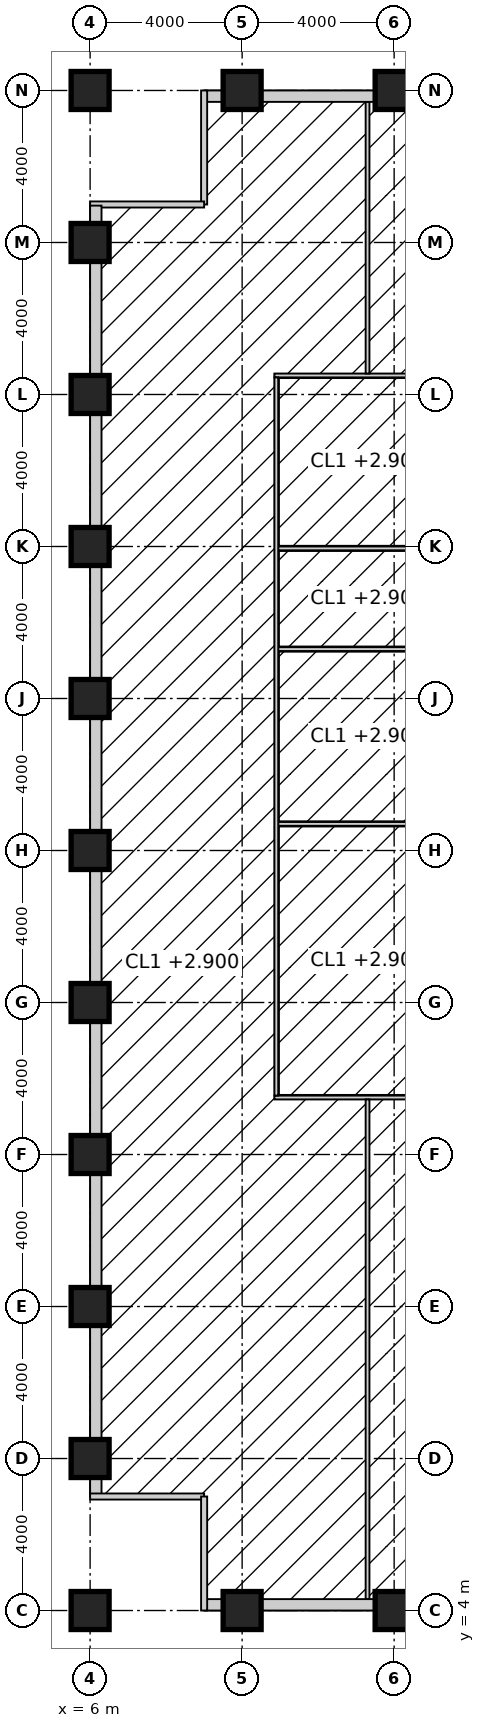
"""IFC4 building model, lengths in metres.
Left out: names, types, materials, properties, quantities, classifications, styles, units other than length and angle.
Written with IfcOpenShell. Run it as: python <this file> out.ifc"""

import sys

from ifc_helpers import new_model, si_unit, direction, frame, frame_2d, origin, origin_2d, place, context, subcontext, project, spatial, rectangle, hollow_rectangle, extrude, element, fill, save


model = new_model("IFC4")
c1 = context("Model", 3, precision=1e-05, world=origin(), true_north=direction((0.0, 1.0)))
c2 = subcontext(c1, "Body", "Model", "MODEL_VIEW")
j1 = project(units=[si_unit("LENGTHUNIT", "METRE"), si_unit("PLANEANGLEUNIT", "RADIAN")], contexts=[c1])
p1 = place(None, origin())
s1 = spatial("IfcSite", under=j1, at=p1, CompositionType="ELEMENT")
p2 = place(p1, origin())
s2 = spatial("IfcBuilding", under=s1, at=p2, CompositionType="ELEMENT")
p3 = place(p2, frame((0.0, 0.0, 278.2)))
s3 = spatial("IfcBuildingStorey", under=s2, at=p3, CompositionType="ELEMENT", Elevation=278.2)
for number, where, z_axis, x_axis in (
    (1, (6.0, 4.0, 0.0), (0.0, 0.0, 1.0), (1.0, 0.0, 0.0)),
    (2, (6.0, 8.0, 0.0), (0.0, 0.0, 1.0), (1.0, 0.0, 0.0)),
    (3, (6.0, 12.0, 0.0), (0.0, 0.0, 1.0), (1.0, 0.0, 0.0)),
    (4, (6.0, 16.0, 0.0), (0.0, 0.0, 1.0), (1.0, 0.0, 0.0)),
    (5, (6.0, 20.0, 0.0), (0.0, 0.0, 1.0), (1.0, 0.0, 0.0)),
    (6, (6.0, 24.0, 0.0), (0.0, 0.0, 1.0), (1.0, 0.0, 0.0)),
    (7, (6.0, 28.0, 0.0), (0.0, 0.0, 1.0), (1.0, 0.0, 0.0)),
    (8, (6.0, 32.0, 0.0), (0.0, 0.0, 1.0), (1.0, 0.0, 0.0)),
    (9, (6.0, 36.0, 0.0), (0.0, 0.0, 1.0), (1.0, 0.0, 0.0)),
    (10, (6.0, 40.0, 0.0), (0.0, 0.0, 1.0), (1.0, 0.0, 0.0)),
    (11, (6.0, 44.0, 0.0), (0.0, 0.0, 1.0), (1.0, 0.0, 0.0)),
    (12, (10.0, 4.0, 0.0), (0.0, 0.0, 1.0), (1.0, 0.0, 0.0)),
    (13, (10.0, 44.0, 0.0), (0.0, 0.0, 1.0), (1.0, 0.0, 0.0)),
    (14, (14.0, 4.0, 0.0), (0.0, 0.0, 1.0), (1.0, 0.0, 0.0)),
    (15, (14.0, 44.0, 0.0), (0.0, 0.0, 1.0), (1.0, 0.0, 0.0)),
):
    element("IfcColumn", number, at=place(p3, frame(where, z_axis=z_axis, x_axis=x_axis)), inside=s3, PredefinedType="COLUMN", context=c2, shape_type="SweptSolid", body=[
        extrude(hollow_rectangle(XDim=1.0, YDim=1.0, WallThickness=0.1, at=origin_2d()), origin(), (0.0, 0.0, 1.0), 4.0),
    ])
p4 = place(p3, frame((10.85, 17.5, 0.0), z_axis=(0.0, 0.0, 1.0), x_axis=(1.0, 0.0, 0.0)))
e16 = element("IfcWall", 16, at=p4, inside=s3, PredefinedType="PARTITIONING", context=c2, shape_type="SweptSolid", body=[
    extrude(rectangle(XDim=4.9, YDim=0.1, at=frame_2d((2.45, 0.0))), origin(), (0.0, 0.0, 1.0), 3.85),
])
for number, where, z_axis, x_axis in (
    (17, (10.95, 24.7, 0.0), (0.0, 0.0, 1.0), (1.0, 0.0, 0.0)),
    (18, (10.95, 29.3, 0.0), (0.0, 0.0, 1.0), (1.0, 0.0, 0.0)),
):
    element("IfcWall", number, at=place(p3, frame(where, z_axis=z_axis, x_axis=x_axis)), inside=s3, PredefinedType="PARTITIONING", context=c2, shape_type="SweptSolid", body=[
        extrude(rectangle(XDim=4.7, YDim=0.1, at=frame_2d((2.35, 0.0))), origin(), (0.0, 0.0, 1.0), 3.85),
    ])
p5 = place(p3, frame((10.95, 31.95, 0.0), z_axis=(0.0, 0.0, 1.0), x_axis=(1.0, 0.0, 0.0)))
e19 = element("IfcWall", 19, at=p5, inside=s3, PredefinedType="PARTITIONING", context=c2, shape_type="SweptSolid", body=[
    extrude(rectangle(XDim=4.7, YDim=0.1, at=frame_2d((2.35, 0.0))), origin(), (0.0, 0.0, 1.0), 2.95),
])
p6 = place(p3, frame((10.85, 36.5, 0.0), z_axis=(0.0, 0.0, 1.0), x_axis=(1.0, 0.0, 0.0)))
e20 = element("IfcWall", 20, at=p6, inside=s3, PredefinedType="PARTITIONING", context=c2, shape_type="SweptSolid", body=[
    extrude(rectangle(XDim=4.9, YDim=0.1, at=frame_2d((2.45, 0.0))), origin(), (0.0, 0.0, 1.0), 2.85),
])
p7 = place(p3, frame((10.9, 17.55, 0.0), z_axis=(0.0, 0.0, 1.0), x_axis=(0.0, 1.0, 0.0)))
e21 = element("IfcWall", 21, at=p7, inside=s3, PredefinedType="PARTITIONING", context=c2, shape_type="SweptSolid", body=[
    extrude(rectangle(XDim=18.9, YDim=0.1, at=frame_2d((9.45, 0.0))), origin(), (0.0, 0.0, 1.0), 3.85),
])
p8 = place(p7, frame((2.65, 0.0, 0.0)))
e22 = element("IfcOpeningElement", 22, at=p8, cuts=e21, PredefinedType="OPENING", context=c2, shape_type="SweptSolid", body=[
    extrude(rectangle(XDim=1.8, YDim=2.4, at=frame_2d((0.9, 1.2))), frame((0.0, 0.06, 0.0), z_axis=(0.0, -1.0, 0.0), x_axis=(1.0, 0.0, 0.0)), (0.0, 0.0, 1.0), 0.12),
])
p9 = place(p7, frame((8.95, 0.0, 0.0)))
e23 = element("IfcOpeningElement", 23, at=p9, cuts=e21, PredefinedType="OPENING", context=c2, shape_type="SweptSolid", body=[
    extrude(rectangle(XDim=1.0, YDim=2.2, at=frame_2d((0.5, 1.1))), frame((0.0, 0.06, 0.0), z_axis=(0.0, -1.0, 0.0), x_axis=(1.0, 0.0, 0.0)), (0.0, 0.0, 1.0), 0.12),
])
p10 = place(p7, frame((12.575, 0.0, 0.0)))
e24 = element("IfcOpeningElement", 24, at=p10, cuts=e21, PredefinedType="OPENING", context=c2, shape_type="SweptSolid", body=[
    extrude(rectangle(XDim=1.0, YDim=2.2, at=frame_2d((0.5, 1.1))), frame((0.0, 0.06, 0.0), z_axis=(0.0, -1.0, 0.0), x_axis=(1.0, 0.0, 0.0)), (0.0, 0.0, 1.0), 0.12),
])
p11 = place(p7, frame((16.175, 0.0, 0.0)))
e25 = element("IfcOpeningElement", 25, at=p11, cuts=e21, PredefinedType="OPENING", context=c2, shape_type="SweptSolid", body=[
    extrude(rectangle(XDim=1.0, YDim=2.2, at=frame_2d((0.5, 1.1))), frame((0.0, 0.06, 0.0), z_axis=(0.0, -1.0, 0.0), x_axis=(1.0, 0.0, 0.0)), (0.0, 0.0, 1.0), 0.12),
])
p12 = place(p3, frame((13.3, 4.3, 0.0), z_axis=(0.0, 0.0, 1.0), x_axis=(0.0, 1.0, 0.0)))
e26 = element("IfcWall", 26, at=p12, inside=s3, PredefinedType="PARTITIONING", context=c2, shape_type="SweptSolid", body=[
    extrude(rectangle(XDim=13.15, YDim=0.1, at=frame_2d((6.575, 0.0))), origin(), (0.0, 0.0, 1.0), 3.85),
])
p13 = place(p12, frame((6.075, 0.0, 0.0)))
e27 = element("IfcOpeningElement", 27, at=p13, cuts=e26, PredefinedType="OPENING", context=c2, shape_type="SweptSolid", body=[
    extrude(rectangle(XDim=1.0, YDim=2.2, at=frame_2d((0.5, 1.1))), frame((0.0, 0.06, 0.0), z_axis=(0.0, -1.0, 0.0), x_axis=(1.0, 0.0, 0.0)), (0.0, 0.0, 1.0), 0.12),
])
p14 = place(p3, frame((13.3, 36.55, 0.0), z_axis=(0.0, 0.0, 1.0), x_axis=(0.0, 1.0, 0.0)))
e28 = element("IfcWall", 28, at=p14, inside=s3, PredefinedType="PARTITIONING", context=c2, shape_type="SweptSolid", body=[
    extrude(rectangle(XDim=7.15, YDim=0.1, at=frame_2d((3.575, 0.0))), origin(), (0.0, 0.0, 1.0), 3.85),
])
p15 = place(p3, frame((9.03, 4.15, 0.0), z_axis=(0.0, 0.0, 1.0), x_axis=(1.0, 0.0, 0.0)))
e29 = element("IfcWall", 29, at=p15, inside=s3, PredefinedType="ELEMENTEDWALL", context=c2, shape_type="SweptSolid", body=[
    extrude(rectangle(XDim=0.47, YDim=0.3, at=frame_2d((0.235, 0.0))), origin(), (0.0, 0.0, 1.0), 2.95),
])
p16 = place(p3, frame((10.5, 4.15, 0.0), z_axis=(0.0, 0.0, 1.0), x_axis=(1.0, 0.0, 0.0)))
e30 = element("IfcWall", 30, at=p16, inside=s3, PredefinedType="ELEMENTEDWALL", context=c2, shape_type="SweptSolid", body=[
    extrude(rectangle(XDim=3.0, YDim=0.3, at=frame_2d((1.5, 0.0))), origin(), (0.0, 0.0, 1.0), 2.85),
])
p17 = place(p16, frame((0.5, 0.0, 0.8)))
e31 = element("IfcOpeningElement", 31, at=p17, cuts=e30, PredefinedType="OPENING", context=c2, shape_type="SweptSolid", body=[
    extrude(rectangle(XDim=2.0, YDim=2.0, at=frame_2d((1.0, 1.0))), frame((0.0, 0.16, 0.0), z_axis=(0.0, -1.0, 0.0), x_axis=(1.0, 0.0, 0.0)), (0.0, 0.0, 1.0), 0.32),
])
p18 = place(p3, frame((9.5, 43.85, 0.0), z_axis=(0.0, 0.0, 1.0), x_axis=(-1.0, 0.0, 0.0)))
e32 = element("IfcWall", 32, at=p18, inside=s3, PredefinedType="ELEMENTEDWALL", context=c2, shape_type="SweptSolid", body=[
    extrude(rectangle(XDim=0.47, YDim=0.3, at=frame_2d((0.235, 0.0))), origin(), (0.0, 0.0, 1.0), 2.95),
])
p19 = place(p3, frame((13.5, 43.85, 0.0), z_axis=(0.0, 0.0, 1.0), x_axis=(-1.0, 0.0, 0.0)))
e33 = element("IfcWall", 33, at=p19, inside=s3, PredefinedType="ELEMENTEDWALL", context=c2, shape_type="SweptSolid", body=[
    extrude(rectangle(XDim=3.0, YDim=0.3, at=frame_2d((1.5, 0.0))), origin(), (0.0, 0.0, 1.0), 2.85),
])
p20 = place(p19, frame((0.5, 0.0, 0.8)))
e34 = element("IfcOpeningElement", 34, at=p20, cuts=e33, PredefinedType="OPENING", context=c2, shape_type="SweptSolid", body=[
    extrude(rectangle(XDim=2.0, YDim=2.0, at=frame_2d((1.0, 1.0))), frame((0.0, 0.16, 0.0), z_axis=(0.0, -1.0, 0.0), x_axis=(1.0, 0.0, 0.0)), (0.0, 0.0, 1.0), 0.32),
])
p21 = place(p3, frame((6.15, 7.5, 0.0), z_axis=(0.0, 0.0, 1.0), x_axis=(0.0, -1.0, 0.0)))
e35 = element("IfcWall", 35, at=p21, inside=s3, PredefinedType="ELEMENTEDWALL", context=c2, shape_type="SweptSolid", body=[
    extrude(rectangle(XDim=0.47, YDim=0.3, at=frame_2d((0.235, 0.0))), origin(), (0.0, 0.0, 1.0), 2.95),
])
p22 = place(p3, frame((6.15, 11.5, 0.0), z_axis=(0.0, 0.0, 1.0), x_axis=(0.0, -1.0, 0.0)))
e36 = element("IfcWall", 36, at=p22, inside=s3, PredefinedType="ELEMENTEDWALL", context=c2, shape_type="SweptSolid", body=[
    extrude(rectangle(XDim=3.0, YDim=0.3, at=frame_2d((1.5, 0.0))), origin(), (0.0, 0.0, 1.0), 2.85),
])
p23 = place(p22, frame((0.5, 0.0, 0.8)))
e37 = element("IfcOpeningElement", 37, at=p23, cuts=e36, PredefinedType="OPENING", context=c2, shape_type="SweptSolid", body=[
    extrude(rectangle(XDim=2.0, YDim=2.0, at=frame_2d((1.0, 1.0))), frame((0.0, 0.16, 0.0), z_axis=(0.0, -1.0, 0.0), x_axis=(1.0, 0.0, 0.0)), (0.0, 0.0, 1.0), 0.32),
])
p24 = place(p3, frame((6.15, 15.5, 0.0), z_axis=(0.0, 0.0, 1.0), x_axis=(0.0, -1.0, 0.0)))
e38 = element("IfcWall", 38, at=p24, inside=s3, PredefinedType="ELEMENTEDWALL", context=c2, shape_type="SweptSolid", body=[
    extrude(rectangle(XDim=3.0, YDim=0.3, at=frame_2d((1.5, 0.0))), origin(), (0.0, 0.0, 1.0), 2.85),
])
p25 = place(p24, frame((0.5, 0.0, 0.8)))
e39 = element("IfcOpeningElement", 39, at=p25, cuts=e38, PredefinedType="OPENING", context=c2, shape_type="SweptSolid", body=[
    extrude(rectangle(XDim=2.0, YDim=2.0, at=frame_2d((1.0, 1.0))), frame((0.0, 0.16, 0.0), z_axis=(0.0, -1.0, 0.0), x_axis=(1.0, 0.0, 0.0)), (0.0, 0.0, 1.0), 0.32),
])
p26 = place(p3, frame((6.15, 19.5, 0.0), z_axis=(0.0, 0.0, 1.0), x_axis=(0.0, -1.0, 0.0)))
e40 = element("IfcWall", 40, at=p26, inside=s3, PredefinedType="ELEMENTEDWALL", context=c2, shape_type="SweptSolid", body=[
    extrude(rectangle(XDim=3.0, YDim=0.3, at=frame_2d((1.5, 0.0))), origin(), (0.0, 0.0, 1.0), 2.85),
])
p27 = place(p26, frame((0.5, 0.0, 0.8)))
e41 = element("IfcOpeningElement", 41, at=p27, cuts=e40, PredefinedType="OPENING", context=c2, shape_type="SweptSolid", body=[
    extrude(rectangle(XDim=2.0, YDim=2.0, at=frame_2d((1.0, 1.0))), frame((0.0, 0.16, 0.0), z_axis=(0.0, -1.0, 0.0), x_axis=(1.0, 0.0, 0.0)), (0.0, 0.0, 1.0), 0.32),
])
p28 = place(p3, frame((6.15, 23.5, 0.0), z_axis=(0.0, 0.0, 1.0), x_axis=(0.0, -1.0, 0.0)))
e42 = element("IfcWall", 42, at=p28, inside=s3, PredefinedType="ELEMENTEDWALL", context=c2, shape_type="SweptSolid", body=[
    extrude(rectangle(XDim=3.0, YDim=0.3, at=frame_2d((1.5, 0.0))), origin(), (0.0, 0.0, 1.0), 2.85),
])
p29 = place(p28, frame((0.5, 0.0, 0.8)))
e43 = element("IfcOpeningElement", 43, at=p29, cuts=e42, PredefinedType="OPENING", context=c2, shape_type="SweptSolid", body=[
    extrude(rectangle(XDim=2.0, YDim=2.0, at=frame_2d((1.0, 1.0))), frame((0.0, 0.16, 0.0), z_axis=(0.0, -1.0, 0.0), x_axis=(1.0, 0.0, 0.0)), (0.0, 0.0, 1.0), 0.32),
])
p30 = place(p3, frame((6.15, 27.5, 0.0), z_axis=(0.0, 0.0, 1.0), x_axis=(0.0, -1.0, 0.0)))
e44 = element("IfcWall", 44, at=p30, inside=s3, PredefinedType="ELEMENTEDWALL", context=c2, shape_type="SweptSolid", body=[
    extrude(rectangle(XDim=3.0, YDim=0.3, at=frame_2d((1.5, 0.0))), origin(), (0.0, 0.0, 1.0), 2.85),
])
p31 = place(p30, frame((0.5, 0.0, 0.8)))
e45 = element("IfcOpeningElement", 45, at=p31, cuts=e44, PredefinedType="OPENING", context=c2, shape_type="SweptSolid", body=[
    extrude(rectangle(XDim=2.0, YDim=2.0, at=frame_2d((1.0, 1.0))), frame((0.0, 0.16, 0.0), z_axis=(0.0, -1.0, 0.0), x_axis=(1.0, 0.0, 0.0)), (0.0, 0.0, 1.0), 0.32),
])
p32 = place(p3, frame((6.15, 31.5, 0.0), z_axis=(0.0, 0.0, 1.0), x_axis=(0.0, -1.0, 0.0)))
e46 = element("IfcWall", 46, at=p32, inside=s3, PredefinedType="ELEMENTEDWALL", context=c2, shape_type="SweptSolid", body=[
    extrude(rectangle(XDim=3.0, YDim=0.3, at=frame_2d((1.5, 0.0))), origin(), (0.0, 0.0, 1.0), 2.85),
])
p33 = place(p32, frame((0.5, 0.0, 0.8)))
e47 = element("IfcOpeningElement", 47, at=p33, cuts=e46, PredefinedType="OPENING", context=c2, shape_type="SweptSolid", body=[
    extrude(rectangle(XDim=2.0, YDim=2.0, at=frame_2d((1.0, 1.0))), frame((0.0, 0.16, 0.0), z_axis=(0.0, -1.0, 0.0), x_axis=(1.0, 0.0, 0.0)), (0.0, 0.0, 1.0), 0.32),
])
p34 = place(p3, frame((6.15, 35.5, 0.0), z_axis=(0.0, 0.0, 1.0), x_axis=(0.0, -1.0, 0.0)))
e48 = element("IfcWall", 48, at=p34, inside=s3, PredefinedType="ELEMENTEDWALL", context=c2, shape_type="SweptSolid", body=[
    extrude(rectangle(XDim=3.0, YDim=0.3, at=frame_2d((1.5, 0.0))), origin(), (0.0, 0.0, 1.0), 2.85),
])
p35 = place(p34, frame((0.5, 0.0, 0.8)))
e49 = element("IfcOpeningElement", 49, at=p35, cuts=e48, PredefinedType="OPENING", context=c2, shape_type="SweptSolid", body=[
    extrude(rectangle(XDim=2.0, YDim=2.0, at=frame_2d((1.0, 1.0))), frame((0.0, 0.16, 0.0), z_axis=(0.0, -1.0, 0.0), x_axis=(1.0, 0.0, 0.0)), (0.0, 0.0, 1.0), 0.32),
])
p36 = place(p3, frame((6.15, 39.5, 0.0), z_axis=(0.0, 0.0, 1.0), x_axis=(0.0, -1.0, 0.0)))
e50 = element("IfcWall", 50, at=p36, inside=s3, PredefinedType="ELEMENTEDWALL", context=c2, shape_type="SweptSolid", body=[
    extrude(rectangle(XDim=3.0, YDim=0.3, at=frame_2d((1.5, 0.0))), origin(), (0.0, 0.0, 1.0), 2.85),
])
p37 = place(p36, frame((0.5, 0.0, 0.8)))
e51 = element("IfcOpeningElement", 51, at=p37, cuts=e50, PredefinedType="OPENING", context=c2, shape_type="SweptSolid", body=[
    extrude(rectangle(XDim=2.0, YDim=2.0, at=frame_2d((1.0, 1.0))), frame((0.0, 0.16, 0.0), z_axis=(0.0, -1.0, 0.0), x_axis=(1.0, 0.0, 0.0)), (0.0, 0.0, 1.0), 0.32),
])
p38 = place(p3, frame((6.15, 40.97, 0.0), z_axis=(0.0, 0.0, 1.0), x_axis=(0.0, -1.0, 0.0)))
e52 = element("IfcWall", 52, at=p38, inside=s3, PredefinedType="ELEMENTEDWALL", context=c2, shape_type="SweptSolid", body=[
    extrude(rectangle(XDim=0.47, YDim=0.3, at=frame_2d((0.235, 0.0))), origin(), (0.0, 0.0, 1.0), 2.95),
])
p39 = place(p8, origin())
e53 = element("IfcDoor", 53, at=p39, inside=s3, OperationType="DOUBLE_DOOR_DOUBLE_SWING", PredefinedType="DOOR", context=c2, shape_type="SweptSolid", body=[
    extrude(rectangle(XDim=1.8, YDim=2.4, at=frame_2d((0.9, 1.2))), frame((0.0, 0.025, 0.0), z_axis=(0.0, -1.0, 0.0), x_axis=(1.0, 0.0, 0.0)), (0.0, 0.0, 1.0), 0.05),
])
fill(e22, e53)
p40 = place(p9, origin())
e54 = element("IfcDoor", 54, at=p40, inside=s3, OperationType="SINGLE_SWING_LEFT", PredefinedType="DOOR", context=c2, shape_type="SweptSolid", body=[
    extrude(rectangle(XDim=1.0, YDim=2.2, at=frame_2d((0.5, 1.1))), frame((0.0, 0.025, 0.0), z_axis=(0.0, -1.0, 0.0), x_axis=(1.0, 0.0, 0.0)), (0.0, 0.0, 1.0), 0.05),
])
fill(e23, e54)
p41 = place(p10, origin())
e55 = element("IfcDoor", 55, at=p41, inside=s3, OperationType="SINGLE_SWING_LEFT", PredefinedType="DOOR", context=c2, shape_type="SweptSolid", body=[
    extrude(rectangle(XDim=1.0, YDim=2.2, at=frame_2d((0.5, 1.1))), frame((0.0, 0.025, 0.0), z_axis=(0.0, -1.0, 0.0), x_axis=(1.0, 0.0, 0.0)), (0.0, 0.0, 1.0), 0.05),
])
fill(e24, e55)
p42 = place(p11, origin())
e56 = element("IfcDoor", 56, at=p42, inside=s3, OperationType="SINGLE_SWING_LEFT", PredefinedType="DOOR", context=c2, shape_type="SweptSolid", body=[
    extrude(rectangle(XDim=1.0, YDim=2.2, at=frame_2d((0.5, 1.1))), frame((0.0, 0.025, 0.0), z_axis=(0.0, -1.0, 0.0), x_axis=(1.0, 0.0, 0.0)), (0.0, 0.0, 1.0), 0.05),
])
fill(e25, e56)
p43 = place(p13, origin())
e57 = element("IfcDoor", 57, at=p43, inside=s3, OperationType="SINGLE_SWING_RIGHT", PredefinedType="DOOR", context=c2, shape_type="SweptSolid", body=[
    extrude(rectangle(XDim=1.0, YDim=2.2, at=frame_2d((0.5, 1.1))), frame((0.0, 0.025, 0.0), z_axis=(0.0, -1.0, 0.0), x_axis=(1.0, 0.0, 0.0)), (0.0, 0.0, 1.0), 0.05),
])
fill(e27, e57)
p44 = place(p17, origin())
e58 = element("IfcWindow", 58, at=p44, inside=s3, PartitioningType="SINGLE_PANEL", PredefinedType="WINDOW", context=c2, shape_type="SweptSolid", body=[
    extrude(rectangle(XDim=2.0, YDim=2.0, at=frame_2d((1.0, 1.0))), frame((0.0, 0.03, 0.0), z_axis=(0.0, -1.0, 0.0), x_axis=(1.0, 0.0, 0.0)), (0.0, 0.0, 1.0), 0.06),
])
fill(e31, e58)
p45 = place(p20, origin())
e59 = element("IfcWindow", 59, at=p45, inside=s3, PartitioningType="SINGLE_PANEL", PredefinedType="WINDOW", context=c2, shape_type="SweptSolid", body=[
    extrude(rectangle(XDim=2.0, YDim=2.0, at=frame_2d((1.0, 1.0))), frame((0.0, 0.03, 0.0), z_axis=(0.0, -1.0, 0.0), x_axis=(1.0, 0.0, 0.0)), (0.0, 0.0, 1.0), 0.06),
])
fill(e34, e59)
p46 = place(p23, origin())
e60 = element("IfcWindow", 60, at=p46, inside=s3, PartitioningType="SINGLE_PANEL", PredefinedType="WINDOW", context=c2, shape_type="SweptSolid", body=[
    extrude(rectangle(XDim=2.0, YDim=2.0, at=frame_2d((1.0, 1.0))), frame((0.0, 0.03, 0.0), z_axis=(0.0, -1.0, 0.0), x_axis=(1.0, 0.0, 0.0)), (0.0, 0.0, 1.0), 0.06),
])
fill(e37, e60)
p47 = place(p25, origin())
e61 = element("IfcWindow", 61, at=p47, inside=s3, PartitioningType="SINGLE_PANEL", PredefinedType="WINDOW", context=c2, shape_type="SweptSolid", body=[
    extrude(rectangle(XDim=2.0, YDim=2.0, at=frame_2d((1.0, 1.0))), frame((0.0, 0.03, 0.0), z_axis=(0.0, -1.0, 0.0), x_axis=(1.0, 0.0, 0.0)), (0.0, 0.0, 1.0), 0.06),
])
fill(e39, e61)
p48 = place(p27, origin())
e62 = element("IfcWindow", 62, at=p48, inside=s3, PartitioningType="SINGLE_PANEL", PredefinedType="WINDOW", context=c2, shape_type="SweptSolid", body=[
    extrude(rectangle(XDim=2.0, YDim=2.0, at=frame_2d((1.0, 1.0))), frame((0.0, 0.03, 0.0), z_axis=(0.0, -1.0, 0.0), x_axis=(1.0, 0.0, 0.0)), (0.0, 0.0, 1.0), 0.06),
])
fill(e41, e62)
p49 = place(p29, origin())
e63 = element("IfcWindow", 63, at=p49, inside=s3, PartitioningType="SINGLE_PANEL", PredefinedType="WINDOW", context=c2, shape_type="SweptSolid", body=[
    extrude(rectangle(XDim=2.0, YDim=2.0, at=frame_2d((1.0, 1.0))), frame((0.0, 0.03, 0.0), z_axis=(0.0, -1.0, 0.0), x_axis=(1.0, 0.0, 0.0)), (0.0, 0.0, 1.0), 0.06),
])
fill(e43, e63)
p50 = place(p31, origin())
e64 = element("IfcWindow", 64, at=p50, inside=s3, PartitioningType="SINGLE_PANEL", PredefinedType="WINDOW", context=c2, shape_type="SweptSolid", body=[
    extrude(rectangle(XDim=2.0, YDim=2.0, at=frame_2d((1.0, 1.0))), frame((0.0, 0.03, 0.0), z_axis=(0.0, -1.0, 0.0), x_axis=(1.0, 0.0, 0.0)), (0.0, 0.0, 1.0), 0.06),
])
fill(e45, e64)
p51 = place(p33, origin())
e65 = element("IfcWindow", 65, at=p51, inside=s3, PartitioningType="SINGLE_PANEL", PredefinedType="WINDOW", context=c2, shape_type="SweptSolid", body=[
    extrude(rectangle(XDim=2.0, YDim=2.0, at=frame_2d((1.0, 1.0))), frame((0.0, 0.03, 0.0), z_axis=(0.0, -1.0, 0.0), x_axis=(1.0, 0.0, 0.0)), (0.0, 0.0, 1.0), 0.06),
])
fill(e47, e65)
p52 = place(p35, origin())
e66 = element("IfcWindow", 66, at=p52, inside=s3, PartitioningType="SINGLE_PANEL", PredefinedType="WINDOW", context=c2, shape_type="SweptSolid", body=[
    extrude(rectangle(XDim=2.0, YDim=2.0, at=frame_2d((1.0, 1.0))), frame((0.0, 0.03, 0.0), z_axis=(0.0, -1.0, 0.0), x_axis=(1.0, 0.0, 0.0)), (0.0, 0.0, 1.0), 0.06),
])
fill(e49, e66)
p53 = place(p37, origin())
e67 = element("IfcWindow", 67, at=p53, inside=s3, PartitioningType="SINGLE_PANEL", PredefinedType="WINDOW", context=c2, shape_type="SweptSolid", body=[
    extrude(rectangle(XDim=2.0, YDim=2.0, at=frame_2d((1.0, 1.0))), frame((0.0, 0.03, 0.0), z_axis=(0.0, -1.0, 0.0), x_axis=(1.0, 0.0, 0.0)), (0.0, 0.0, 1.0), 0.06),
])
fill(e51, e67)
save(model, sys.argv[1])
